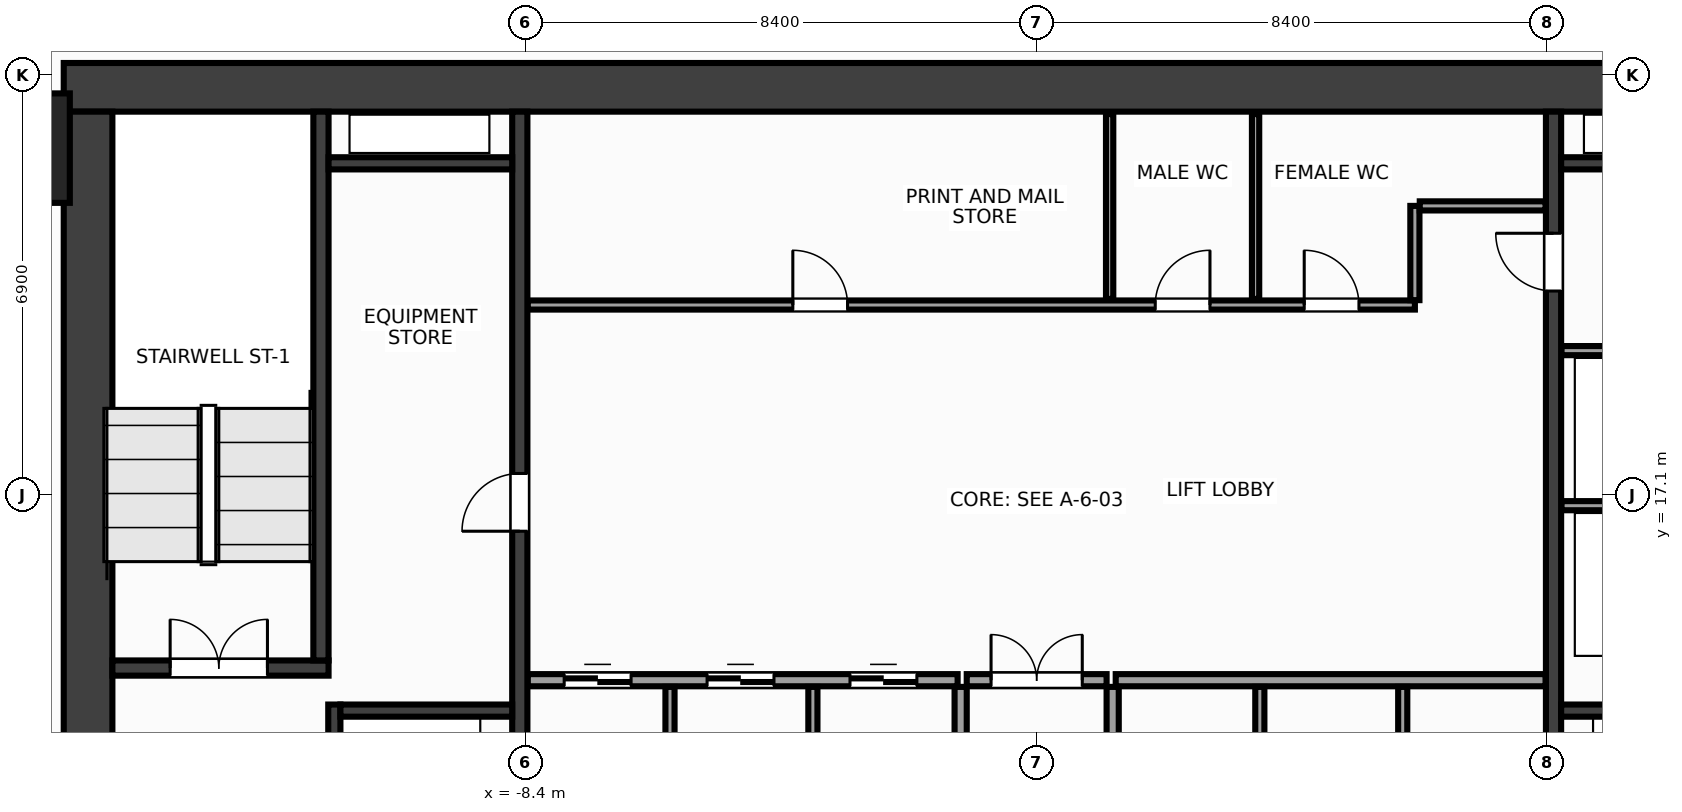
"""IFC4 building model, lengths in metres.
Left out: names, types, materials, properties, quantities, classifications, styles, units other than length and angle.
Written with IfcOpenShell. Run it as: python <this file> out.ifc"""

import sys

from ifc_helpers import new_model, si_unit, direction, frame, frame_2d, origin, origin_2d, place, context, subcontext, project, spatial, rectangle, extrude, source, transform, mapped, element, fill, save


model = new_model("IFC4")
c1 = context("Model", 3, precision=1e-05, world=origin(), true_north=direction((0.0, 1.0)))
c2 = subcontext(c1, "Body", "Model", "MODEL_VIEW")
j1 = project(units=[si_unit("LENGTHUNIT", "METRE"), si_unit("PLANEANGLEUNIT", "RADIAN")], contexts=[c1])
p1 = place(None, origin())
s1 = spatial("IfcSite", under=j1, at=p1, CompositionType="ELEMENT")
p2 = place(p1, origin())
s2 = spatial("IfcBuilding", under=s1, at=p2, CompositionType="ELEMENT")
p3 = place(p2, frame((0.0, 0.0, 48.8)))
s3 = spatial("IfcBuildingStorey", under=s2, at=p3, CompositionType="ELEMENT", Elevation=48.8)
m1 = source(origin(), c2, "Body", "SweptSolid", [
    extrude(rectangle(XDim=32.0, YDim=0.8, at=frame_2d((16.0, 0.0))), origin(), (0.0, 0.0, 1.0), 3.6),
])
p4 = place(p3, frame((-16.0, 23.8, 0.0), z_axis=(0.0, 0.0, 1.0), x_axis=(1.0, 0.0, 0.0)))
e1 = element("IfcWall", 1, at=p4, inside=s3, PredefinedType="SHEAR", context=c2, shape_type="MappedRepresentation", body=[
    mapped(m1, transform((0.0, 0.0, 0.0), x_axis=(1.0, 0.0, 0.0), y_axis=(0.0, 1.0, 0.0), z_axis=(0.0, 0.0, 1.0), scale=1.0)),
])
m2 = source(origin(), c2, "Body", "SweptSolid", [
    extrude(rectangle(XDim=12.8, YDim=0.8, at=frame_2d((6.4, 0.0))), origin(), (0.0, 0.0, 1.0), 3.6),
])
p5 = place(p3, frame((-15.6, 10.6, 0.0), z_axis=(0.0, 0.0, 1.0), x_axis=(0.0, 1.0, 0.0)))
e2 = element("IfcWall", 2, at=p5, inside=s3, PredefinedType="SHEAR", context=c2, shape_type="MappedRepresentation", body=[
    mapped(m2, transform((0.0, 0.0, 0.0), x_axis=(1.0, 0.0, 0.0), y_axis=(0.0, 1.0, 0.0), z_axis=(0.0, 0.0, 1.0), scale=1.0)),
])
m3 = source(origin(), c2, "Body", "SweptSolid", [
    extrude(rectangle(XDim=12.8, YDim=0.25, at=frame_2d((6.4, 0.0))), origin(), (0.0, 0.0, 1.0), 3.6),
])
p6 = place(p3, frame((-8.5, 10.6, 0.0), z_axis=(0.0, 0.0, 1.0), x_axis=(0.0, 1.0, 0.0)))
e3 = element("IfcWall", 3, at=p6, inside=s3, PredefinedType="SHEAR", context=c2, shape_type="MappedRepresentation", body=[
    mapped(m3, transform((0.0, 0.0, 0.0), x_axis=(1.0, 0.0, 0.0), y_axis=(0.0, 1.0, 0.0), z_axis=(0.0, 0.0, 1.0), scale=1.0)),
])
p7 = place(p6, frame((5.9, 0.0, 0.0)))
e4 = element("IfcOpeningElement", 4, at=p7, cuts=e3, PredefinedType="OPENING", context=c2, shape_type="SweptSolid", body=[
    extrude(rectangle(XDim=0.95, YDim=2.15, at=frame_2d((0.475, 1.075))), frame((0.0, 0.137, 0.0), z_axis=(0.0, -1.0, 0.0), x_axis=(1.0, 0.0, 0.0)), (0.0, 0.0, 1.0), 0.274),
])
p8 = place(p3, frame((8.5, 10.6, 0.0), z_axis=(0.0, 0.0, 1.0), x_axis=(0.0, 1.0, 0.0)))
e5 = element("IfcWall", 5, at=p8, inside=s3, PredefinedType="SHEAR", context=c2, shape_type="MappedRepresentation", body=[
    mapped(m3, transform((0.0, 0.0, 0.0), x_axis=(1.0, 0.0, 0.0), y_axis=(0.0, 1.0, 0.0), z_axis=(0.0, 0.0, 1.0), scale=1.0)),
])
p9 = place(p8, frame((9.85, 0.0, 0.0)))
e6 = element("IfcOpeningElement", 6, at=p9, cuts=e5, PredefinedType="OPENING", context=c2, shape_type="SweptSolid", body=[
    extrude(rectangle(XDim=0.95, YDim=2.15, at=frame_2d((0.475, 1.075))), frame((0.0, 0.137, 0.0), z_axis=(0.0, -1.0, 0.0), x_axis=(1.0, 0.0, 0.0)), (0.0, 0.0, 1.0), 0.274),
])
m4 = source(origin(), c2, "Body", "SweptSolid", [
    extrude(rectangle(XDim=3.555, YDim=0.25, at=frame_2d((1.777, 0.0))), origin(), (0.0, 0.0, 1.0), 3.6),
])
p10 = place(p3, frame((-15.2, 14.25, 0.0), z_axis=(0.0, 0.0, 1.0), x_axis=(1.0, 0.0, 0.0)))
e7 = element("IfcWall", 7, at=p10, inside=s3, PredefinedType="SHEAR", context=c2, shape_type="MappedRepresentation", body=[
    mapped(m4, transform((0.0, 0.0, 0.0), x_axis=(1.0, 0.0, 0.0), y_axis=(0.0, 1.0, 0.0), z_axis=(0.0, 0.0, 1.0), scale=1.0)),
])
p11 = place(p10, frame((0.95, 0.0, 0.0)))
e8 = element("IfcOpeningElement", 8, at=p11, cuts=e7, PredefinedType="OPENING", context=c2, shape_type="SweptSolid", body=[
    extrude(rectangle(XDim=1.6, YDim=2.15, at=frame_2d((0.8, 1.075))), frame((0.0, 0.137, 0.0), z_axis=(0.0, -1.0, 0.0), x_axis=(1.0, 0.0, 0.0)), (0.0, 0.0, 1.0), 0.274),
])
m5 = source(origin(), c2, "Body", "SweptSolid", [
    extrude(rectangle(XDim=9.025, YDim=0.25, at=frame_2d((4.512, 0.0))), origin(), (0.0, 0.0, 1.0), 3.6),
])
p12 = place(p3, frame((-11.77, 14.375, 0.0), z_axis=(0.0, 0.0, 1.0), x_axis=(0.0, 1.0, 0.0)))
e9 = element("IfcWall", 9, at=p12, inside=s3, PredefinedType="SHEAR", context=c2, shape_type="MappedRepresentation", body=[
    mapped(m5, transform((0.0, 0.0, 0.0), x_axis=(1.0, 0.0, 0.0), y_axis=(0.0, 1.0, 0.0), z_axis=(0.0, 0.0, 1.0), scale=1.0)),
])
m6 = source(origin(), c2, "Body", "SweptSolid", [
    extrude(rectangle(XDim=3.05, YDim=0.2, at=frame_2d((1.525, 0.0))), origin(), (0.0, 0.0, 1.0), 3.6),
])
p13 = place(p3, frame((-11.55, 10.6, 0.0), z_axis=(0.0, 0.0, 1.0), x_axis=(0.0, 1.0, 0.0)))
e10 = element("IfcWall", 10, at=p13, inside=s3, PredefinedType="SHEAR", context=c2, shape_type="MappedRepresentation", body=[
    mapped(m6, transform((0.0, 0.0, 0.0), x_axis=(1.0, 0.0, 0.0), y_axis=(0.0, 1.0, 0.0), z_axis=(0.0, 0.0, 1.0), scale=1.0)),
])
p14 = place(p13, frame((0.9, 0.0, 0.0)))
e11 = element("IfcOpeningElement", 11, at=p14, cuts=e10, PredefinedType="OPENING", context=c2, shape_type="SweptSolid", body=[
    extrude(rectangle(XDim=1.1, YDim=2.15, at=frame_2d((0.55, 1.075))), frame((0.0, 0.112, 0.0), z_axis=(0.0, -1.0, 0.0), x_axis=(1.0, 0.0, 0.0)), (0.0, 0.0, 1.0), 0.224),
])
m7 = source(origin(), c2, "Body", "SweptSolid", [
    extrude(rectangle(XDim=2.825, YDim=0.2, at=frame_2d((1.413, 0.0))), origin(), (0.0, 0.0, 1.0), 3.6),
])
for number, where, z_axis, x_axis in (
    (12, (-11.45, 13.55, 0.0), (0.0, 0.0, 1.0), (1.0, 0.0, 0.0)),
    (13, (8.625, 13.55, 0.0), (0.0, 0.0, 1.0), (1.0, 0.0, 0.0)),
):
    element("IfcWall", number, at=place(p3, frame(where, z_axis=z_axis, x_axis=x_axis)), inside=s3, PredefinedType="SHEAR", context=c2, shape_type="MappedRepresentation", body=[
        mapped(m7, transform((0.0, 0.0, 0.0), x_axis=(1.0, 0.0, 0.0), y_axis=(0.0, 1.0, 0.0), z_axis=(0.0, 0.0, 1.0), scale=1.0)),
    ])
m8 = source(origin(), c2, "Body", "SweptSolid", [
    extrude(rectangle(XDim=3.02, YDim=0.2, at=frame_2d((1.51, 0.0))), origin(), (0.0, 0.0, 1.0), 3.6),
])
for number, where, z_axis, x_axis in (
    (14, (-11.645, 22.55, 0.0), (0.0, 0.0, 1.0), (1.0, 0.0, 0.0)),
    (15, (8.625, 22.55, 0.0), (0.0, 0.0, 1.0), (1.0, 0.0, 0.0)),
):
    element("IfcWall", number, at=place(p3, frame(where, z_axis=z_axis, x_axis=x_axis)), inside=s3, PredefinedType="SHEAR", context=c2, shape_type="MappedRepresentation", body=[
        mapped(m8, transform((0.0, 0.0, 0.0), x_axis=(1.0, 0.0, 0.0), y_axis=(0.0, 1.0, 0.0), z_axis=(0.0, 0.0, 1.0), scale=1.0)),
    ])
m9 = source(origin(), c2, "Body", "SweptSolid", [
    extrude(rectangle(XDim=1.8, YDim=1.8, at=origin_2d()), origin(), (0.0, 0.0, 1.0), 3.6),
])
p15 = place(p3, frame((-16.8, 22.8, 0.0), z_axis=(0.0, 0.0, 1.0), x_axis=(1.0, 0.0, 0.0)))
e16 = element("IfcColumn", 16, at=p15, inside=s3, PredefinedType="COLUMN", context=c2, shape_type="MappedRepresentation", body=[
    mapped(m9, transform((0.0, 0.0, 0.0), x_axis=(1.0, 0.0, 0.0), y_axis=(0.0, 1.0, 0.0), z_axis=(0.0, 0.0, 1.0), scale=1.0)),
])
m10 = source(origin(), c2, "Body", "SweptSolid", [
    extrude(rectangle(XDim=3.01, YDim=0.15, at=frame_2d((1.505, 0.0))), origin(), (0.0, 0.0, 1.0), 3.36),
])
for number, where, z_axis, x_axis in (
    (17, (8.63, 16.92, 0.0), (0.0, 0.0, 1.0), (1.0, 0.0, 0.0)),
    (18, (8.63, 19.47, 0.0), (0.0, 0.0, 1.0), (1.0, 0.0, 0.0)),
):
    element("IfcWall", number, at=place(p3, frame(where, z_axis=z_axis, x_axis=x_axis)), inside=s3, PredefinedType="PARTITIONING", context=c2, shape_type="MappedRepresentation", body=[
        mapped(m10, transform((0.0, 0.0, 0.0), x_axis=(1.0, 0.0, 0.0), y_axis=(0.0, 1.0, 0.0), z_axis=(0.0, 0.0, 1.0), scale=1.0)),
    ])
m11 = source(origin(), c2, "Body", "SweptSolid", [
    extrude(rectangle(XDim=7.07, YDim=0.2, at=frame_2d((3.535, 0.0))), origin(), (0.0, 0.0, 1.0), 3.36),
])
p16 = place(p3, frame((-8.37, 14.05, 0.0), z_axis=(0.0, 0.0, 1.0), x_axis=(1.0, 0.0, 0.0)))
e19 = element("IfcWall", 19, at=p16, inside=s3, PredefinedType="PARTITIONING", context=c2, shape_type="MappedRepresentation", body=[
    mapped(m11, transform((0.0, 0.0, 0.0), x_axis=(1.0, 0.0, 0.0), y_axis=(0.0, 1.0, 0.0), z_axis=(0.0, 0.0, 1.0), scale=1.0)),
])
p17 = place(p16, frame((0.6, 0.0, 0.0)))
e20 = element("IfcOpeningElement", 20, at=p17, cuts=e19, PredefinedType="OPENING", context=c2, shape_type="SweptSolid", body=[
    extrude(rectangle(XDim=1.1, YDim=2.15, at=frame_2d((0.55, 1.075))), frame((0.0, 0.112, 0.0), z_axis=(0.0, -1.0, 0.0), x_axis=(1.0, 0.0, 0.0)), (0.0, 0.0, 1.0), 0.224),
])
p18 = place(p16, frame((2.95, 0.0, 0.0)))
e21 = element("IfcOpeningElement", 21, at=p18, cuts=e19, PredefinedType="OPENING", context=c2, shape_type="SweptSolid", body=[
    extrude(rectangle(XDim=1.1, YDim=2.15, at=frame_2d((0.55, 1.075))), frame((0.0, 0.112, 0.0), z_axis=(0.0, -1.0, 0.0), x_axis=(1.0, 0.0, 0.0)), (0.0, 0.0, 1.0), 0.224),
])
p19 = place(p16, frame((5.3, 0.0, 0.0)))
e22 = element("IfcOpeningElement", 22, at=p19, cuts=e19, PredefinedType="OPENING", context=c2, shape_type="SweptSolid", body=[
    extrude(rectangle(XDim=1.1, YDim=2.15, at=frame_2d((0.55, 1.075))), frame((0.0, 0.112, 0.0), z_axis=(0.0, -1.0, 0.0), x_axis=(1.0, 0.0, 0.0)), (0.0, 0.0, 1.0), 0.224),
])
p20 = place(p3, frame((1.3, 14.05, 0.0), z_axis=(0.0, 0.0, 1.0), x_axis=(1.0, 0.0, 0.0)))
e23 = element("IfcWall", 23, at=p20, inside=s3, PredefinedType="PARTITIONING", context=c2, shape_type="MappedRepresentation", body=[
    mapped(m11, transform((0.0, 0.0, 0.0), x_axis=(1.0, 0.0, 0.0), y_axis=(0.0, 1.0, 0.0), z_axis=(0.0, 0.0, 1.0), scale=1.0)),
])
m12 = source(origin(), c2, "Body", "SweptSolid", [
    extrude(rectangle(XDim=3.34, YDim=0.2, at=frame_2d((1.67, 0.0))), origin(), (0.0, 0.0, 1.0), 3.36),
])
for number, where, z_axis, x_axis in (
    (24, (-1.25, 10.6, 0.0), (0.0, 0.0, 1.0), (0.0, 1.0, 0.0)),
    (25, (1.25, 10.6, 0.0), (0.0, 0.0, 1.0), (0.0, 1.0, 0.0)),
):
    element("IfcWall", number, at=place(p3, frame(where, z_axis=z_axis, x_axis=x_axis)), inside=s3, PredefinedType="PARTITIONING", context=c2, shape_type="MappedRepresentation", body=[
        mapped(m12, transform((0.0, 0.0, 0.0), x_axis=(1.0, 0.0, 0.0), y_axis=(0.0, 1.0, 0.0), z_axis=(0.0, 0.0, 1.0), scale=1.0)),
    ])
m13 = source(origin(), c2, "Body", "SweptSolid", [
    extrude(rectangle(XDim=2.3, YDim=0.2, at=frame_2d((1.15, 0.0))), origin(), (0.0, 0.0, 1.0), 3.36),
])
p21 = place(p3, frame((-1.15, 14.05, 0.0), z_axis=(0.0, 0.0, 1.0), x_axis=(1.0, 0.0, 0.0)))
e26 = element("IfcWall", 26, at=p21, inside=s3, PredefinedType="PARTITIONING", context=c2, shape_type="MappedRepresentation", body=[
    mapped(m13, transform((0.0, 0.0, 0.0), x_axis=(1.0, 0.0, 0.0), y_axis=(0.0, 1.0, 0.0), z_axis=(0.0, 0.0, 1.0), scale=1.0)),
])
p22 = place(p21, frame((0.4, 0.0, 0.0)))
e27 = element("IfcOpeningElement", 27, at=p22, cuts=e26, PredefinedType="OPENING", context=c2, shape_type="SweptSolid", body=[
    extrude(rectangle(XDim=1.5, YDim=2.2, at=frame_2d((0.75, 1.1))), frame((0.0, 0.112, 0.0), z_axis=(0.0, -1.0, 0.0), x_axis=(1.0, 0.0, 0.0)), (0.0, 0.0, 1.0), 0.224),
])
m14 = source(origin(), c2, "Body", "SweptSolid", [
    extrude(rectangle(XDim=14.59, YDim=0.15, at=frame_2d((7.295, 0.0))), origin(), (0.0, 0.0, 1.0), 3.36),
])
p23 = place(p3, frame((-8.37, 20.22, 0.0), z_axis=(0.0, 0.0, 1.0), x_axis=(1.0, 0.0, 0.0)))
e28 = element("IfcWall", 28, at=p23, inside=s3, PredefinedType="PARTITIONING", context=c2, shape_type="MappedRepresentation", body=[
    mapped(m14, transform((0.0, 0.0, 0.0), x_axis=(1.0, 0.0, 0.0), y_axis=(0.0, 1.0, 0.0), z_axis=(0.0, 0.0, 1.0), scale=1.0)),
])
p24 = place(p23, frame((4.36, 0.0, 0.0)))
e29 = element("IfcOpeningElement", 29, at=p24, cuts=e28, PredefinedType="OPENING", context=c2, shape_type="SweptSolid", body=[
    extrude(rectangle(XDim=0.9, YDim=2.15, at=frame_2d((0.45, 1.075))), frame((0.0, 0.087, 0.0), z_axis=(0.0, -1.0, 0.0), x_axis=(1.0, 0.0, 0.0)), (0.0, 0.0, 1.0), 0.174),
])
p25 = place(p23, frame((10.32, 0.0, 0.0)))
e30 = element("IfcOpeningElement", 30, at=p25, cuts=e28, PredefinedType="OPENING", context=c2, shape_type="SweptSolid", body=[
    extrude(rectangle(XDim=0.9, YDim=2.15, at=frame_2d((0.45, 1.075))), frame((0.0, 0.087, 0.0), z_axis=(0.0, -1.0, 0.0), x_axis=(1.0, 0.0, 0.0)), (0.0, 0.0, 1.0), 0.174),
])
p26 = place(p23, frame((12.77, 0.0, 0.0)))
e31 = element("IfcOpeningElement", 31, at=p26, cuts=e28, PredefinedType="OPENING", context=c2, shape_type="SweptSolid", body=[
    extrude(rectangle(XDim=0.9, YDim=2.15, at=frame_2d((0.45, 1.075))), frame((0.0, 0.087, 0.0), z_axis=(0.0, -1.0, 0.0), x_axis=(1.0, 0.0, 0.0)), (0.0, 0.0, 1.0), 0.174),
])
m15 = source(origin(), c2, "Body", "SweptSolid", [
    extrude(rectangle(XDim=1.55, YDim=0.15, at=frame_2d((0.775, 0.0))), origin(), (0.0, 0.0, 1.0), 3.36),
])
p27 = place(p3, frame((6.22, 20.3, 0.0), z_axis=(0.0, 0.0, 1.0), x_axis=(0.0, 1.0, 0.0)))
e32 = element("IfcWall", 32, at=p27, inside=s3, PredefinedType="PARTITIONING", context=c2, shape_type="MappedRepresentation", body=[
    mapped(m15, transform((0.0, 0.0, 0.0), x_axis=(1.0, 0.0, 0.0), y_axis=(0.0, 1.0, 0.0), z_axis=(0.0, 0.0, 1.0), scale=1.0)),
])
m16 = source(origin(), c2, "Body", "SweptSolid", [
    extrude(rectangle(XDim=2.07, YDim=0.15, at=frame_2d((1.035, 0.0))), origin(), (0.0, 0.0, 1.0), 3.36),
])
p28 = place(p3, frame((6.3, 21.85, 0.0), z_axis=(0.0, 0.0, 1.0), x_axis=(1.0, 0.0, 0.0)))
e33 = element("IfcWall", 33, at=p28, inside=s3, PredefinedType="PARTITIONING", context=c2, shape_type="MappedRepresentation", body=[
    mapped(m16, transform((0.0, 0.0, 0.0), x_axis=(1.0, 0.0, 0.0), y_axis=(0.0, 1.0, 0.0), z_axis=(0.0, 0.0, 1.0), scale=1.0)),
])
m17 = source(origin(), c2, "Body", "SweptSolid", [
    extrude(rectangle(XDim=3.34, YDim=0.15, at=frame_2d((1.67, 0.0))), origin(), (0.0, 0.0, 1.0), 3.36),
])
for number, where, z_axis, x_axis in (
    (34, (-6.03, 10.6, 0.0), (0.0, 0.0, 1.0), (0.0, 1.0, 0.0)),
    (35, (-3.68, 10.6, 0.0), (0.0, 0.0, 1.0), (0.0, 1.0, 0.0)),
    (36, (3.67, 10.6, 0.0), (0.0, 0.0, 1.0), (0.0, 1.0, 0.0)),
    (37, (6.02, 10.6, 0.0), (0.0, 0.0, 1.0), (0.0, 1.0, 0.0)),
):
    element("IfcWall", number, at=place(p3, frame(where, z_axis=z_axis, x_axis=x_axis)), inside=s3, PredefinedType="PARTITIONING", context=c2, shape_type="MappedRepresentation", body=[
        mapped(m17, transform((0.0, 0.0, 0.0), x_axis=(1.0, 0.0, 0.0), y_axis=(0.0, 1.0, 0.0), z_axis=(0.0, 0.0, 1.0), scale=1.0)),
    ])
m18 = source(origin(), c2, "Body", "SweptSolid", [
    extrude(rectangle(XDim=3.04, YDim=0.12, at=frame_2d((1.52, 0.0))), origin(), (0.0, 0.0, 1.0), 3.36),
])
for number, where, z_axis, x_axis in (
    (38, (1.2, 20.32, 0.0), (0.0, 0.0, 1.0), (0.0, 1.0, 0.0)),
    (39, (3.6, 20.32, 0.0), (0.0, 0.0, 1.0), (0.0, 1.0, 0.0)),
):
    element("IfcWall", number, at=place(p3, frame(where, z_axis=z_axis, x_axis=x_axis)), inside=s3, PredefinedType="PARTITIONING", context=c2, shape_type="MappedRepresentation", body=[
        mapped(m18, transform((0.0, 0.0, 0.0), x_axis=(1.0, 0.0, 0.0), y_axis=(0.0, 1.0, 0.0), z_axis=(0.0, 0.0, 1.0), scale=1.0)),
    ])
m19 = source(origin(), c2, "Body", "SweptSolid", [
    extrude(rectangle(XDim=1.6, YDim=2.15, at=frame_2d((0.8, 1.075))), frame((0.0, 0.025, 0.0), z_axis=(0.0, -1.0, 0.0), x_axis=(1.0, 0.0, 0.0)), (0.0, 0.0, 1.0), 0.05),
])
p29 = place(p11, origin())
e40 = element("IfcDoor", 40, at=p29, inside=s3, OperationType="DOUBLE_DOOR_SINGLE_SWING", PredefinedType="DOOR", context=c2, shape_type="MappedRepresentation", body=[
    mapped(m19, transform((0.0, 0.0, 0.0), x_axis=(1.0, 0.0, 0.0), y_axis=(0.0, 1.0, 0.0), z_axis=(0.0, 0.0, 1.0), scale=1.0)),
])
fill(e8, e40)
m20 = source(origin(), c2, "Body", "SweptSolid", [
    extrude(rectangle(XDim=0.95, YDim=2.15, at=frame_2d((0.475, 1.075))), frame((0.0, 0.025, 0.0), z_axis=(0.0, -1.0, 0.0), x_axis=(1.0, 0.0, 0.0)), (0.0, 0.0, 1.0), 0.05),
])
p30 = place(p7, origin())
e41 = element("IfcDoor", 41, at=p30, inside=s3, OperationType="SINGLE_SWING_LEFT", PredefinedType="DOOR", context=c2, shape_type="MappedRepresentation", body=[
    mapped(m20, transform((0.0, 0.0, 0.0), x_axis=(1.0, 0.0, 0.0), y_axis=(0.0, 1.0, 0.0), z_axis=(0.0, 0.0, 1.0), scale=1.0)),
])
fill(e4, e41)
m21 = source(origin(), c2, "Body", "SweptSolid", [
    extrude(rectangle(XDim=0.95, YDim=2.15, at=frame_2d((0.475, 1.075))), frame((0.0, 0.025, 0.0), z_axis=(0.0, -1.0, 0.0), x_axis=(1.0, 0.0, 0.0)), (0.0, 0.0, 1.0), 0.05),
])
p31 = place(p9, origin())
e42 = element("IfcDoor", 42, at=p31, inside=s3, OperationType="SINGLE_SWING_RIGHT", PredefinedType="DOOR", context=c2, shape_type="MappedRepresentation", body=[
    mapped(m21, transform((0.0, 0.0, 0.0), x_axis=(1.0, 0.0, 0.0), y_axis=(0.0, 1.0, 0.0), z_axis=(0.0, 0.0, 1.0), scale=1.0)),
])
fill(e6, e42)
m22 = source(origin(), c2, "Body", "SweptSolid", [
    extrude(rectangle(XDim=1.1, YDim=2.15, at=frame_2d((0.55, 1.075))), frame((0.0, 0.025, 0.0), z_axis=(0.0, -1.0, 0.0), x_axis=(1.0, 0.0, 0.0)), (0.0, 0.0, 1.0), 0.05),
])
p32 = place(p17, origin())
e43 = element("IfcDoor", 43, at=p32, inside=s3, OperationType="DOUBLE_DOOR_SLIDING", PredefinedType="DOOR", context=c2, shape_type="MappedRepresentation", body=[
    mapped(m22, transform((0.0, 0.0, 0.0), x_axis=(1.0, 0.0, 0.0), y_axis=(0.0, 1.0, 0.0), z_axis=(0.0, 0.0, 1.0), scale=1.0)),
])
fill(e20, e43)
p33 = place(p18, origin())
e44 = element("IfcDoor", 44, at=p33, inside=s3, OperationType="DOUBLE_DOOR_SLIDING", PredefinedType="DOOR", context=c2, shape_type="MappedRepresentation", body=[
    mapped(m22, transform((0.0, 0.0, 0.0), x_axis=(1.0, 0.0, 0.0), y_axis=(0.0, 1.0, 0.0), z_axis=(0.0, 0.0, 1.0), scale=1.0)),
])
fill(e21, e44)
p34 = place(p19, origin())
e45 = element("IfcDoor", 45, at=p34, inside=s3, OperationType="DOUBLE_DOOR_SLIDING", PredefinedType="DOOR", context=c2, shape_type="MappedRepresentation", body=[
    mapped(m22, transform((0.0, 0.0, 0.0), x_axis=(1.0, 0.0, 0.0), y_axis=(0.0, 1.0, 0.0), z_axis=(0.0, 0.0, 1.0), scale=1.0)),
])
fill(e22, e45)
m23 = source(origin(), c2, "Body", "SweptSolid", [
    extrude(rectangle(XDim=1.5, YDim=2.2, at=frame_2d((0.75, 1.1))), frame((0.0, 0.025, 0.0), z_axis=(0.0, -1.0, 0.0), x_axis=(1.0, 0.0, 0.0)), (0.0, 0.0, 1.0), 0.05),
])
p35 = place(p22, origin())
e46 = element("IfcDoor", 46, at=p35, inside=s3, OperationType="DOUBLE_DOOR_SINGLE_SWING", PredefinedType="DOOR", context=c2, shape_type="MappedRepresentation", body=[
    mapped(m23, transform((0.0, 0.0, 0.0), x_axis=(1.0, 0.0, 0.0), y_axis=(0.0, 1.0, 0.0), z_axis=(0.0, 0.0, 1.0), scale=1.0)),
])
fill(e27, e46)
m24 = source(origin(), c2, "Body", "SweptSolid", [
    extrude(rectangle(XDim=0.9, YDim=2.15, at=frame_2d((0.45, 1.075))), frame((0.0, 0.025, 0.0), z_axis=(0.0, -1.0, 0.0), x_axis=(1.0, 0.0, 0.0)), (0.0, 0.0, 1.0), 0.05),
])
p36 = place(p24, origin())
e47 = element("IfcDoor", 47, at=p36, inside=s3, OperationType="SINGLE_SWING_LEFT", PredefinedType="DOOR", context=c2, shape_type="MappedRepresentation", body=[
    mapped(m24, transform((0.0, 0.0, 0.0), x_axis=(1.0, 0.0, 0.0), y_axis=(0.0, 1.0, 0.0), z_axis=(0.0, 0.0, 1.0), scale=1.0)),
])
fill(e29, e47)
p37 = place(p25, origin())
e48 = element("IfcDoor", 48, at=p37, inside=s3, OperationType="SINGLE_SWING_RIGHT", PredefinedType="DOOR", context=c2, shape_type="MappedRepresentation", body=[
    mapped(m24, transform((0.0, 0.0, 0.0), x_axis=(1.0, 0.0, 0.0), y_axis=(0.0, 1.0, 0.0), z_axis=(0.0, 0.0, 1.0), scale=1.0)),
])
fill(e30, e48)
p38 = place(p26, origin())
e49 = element("IfcDoor", 49, at=p38, inside=s3, OperationType="SINGLE_SWING_LEFT", PredefinedType="DOOR", context=c2, shape_type="MappedRepresentation", body=[
    mapped(m24, transform((0.0, 0.0, 0.0), x_axis=(1.0, 0.0, 0.0), y_axis=(0.0, 1.0, 0.0), z_axis=(0.0, 0.0, 1.0), scale=1.0)),
])
fill(e31, e49)
save(model, sys.argv[1])
